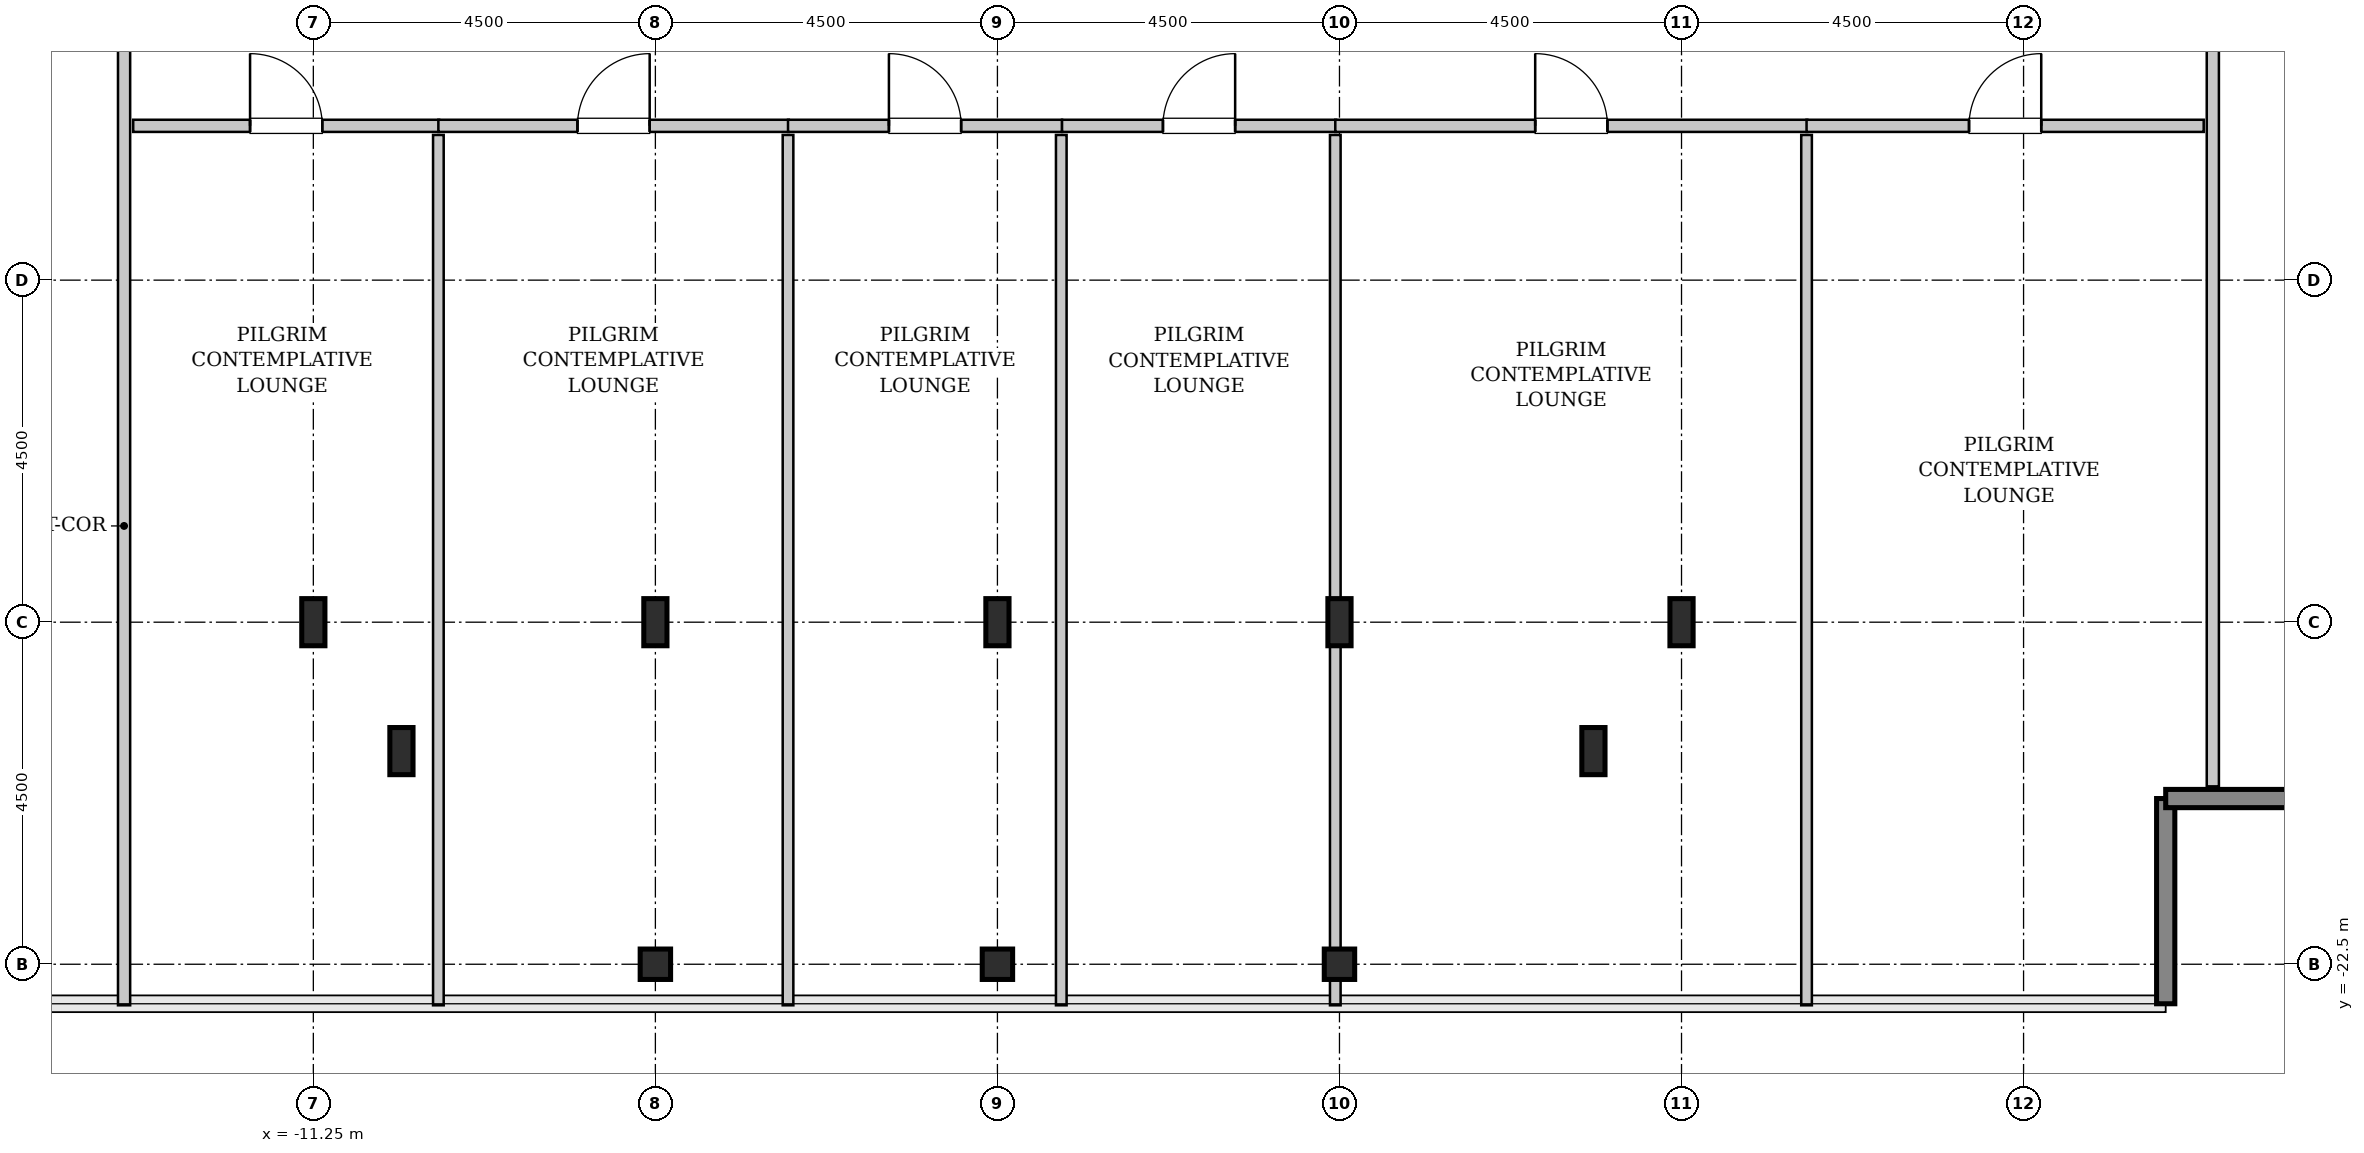
"""IFC4 building model, lengths in metres.
Left out: names, types, materials, properties, quantities, classifications, styles, units other than length and angle.
Written with IfcOpenShell. Run it as: python <this file> out.ifc"""

import sys

from ifc_helpers import new_model, si_unit, direction, frame, frame_2d, origin, origin_2d, place, context, subcontext, project, spatial, rectangle, hollow_rectangle, i_section, extrude, source, transform, mapped, element, fill, save


model = new_model("IFC4")
c1 = context("Model", 3, precision=1e-05, world=origin(), true_north=direction((0.0, 1.0)))
c2 = subcontext(c1, "Body", "Model", "MODEL_VIEW")
j1 = project(units=[si_unit("LENGTHUNIT", "METRE"), si_unit("PLANEANGLEUNIT", "RADIAN")], contexts=[c1])
p1 = place(None, origin())
s1 = spatial("IfcSite", under=j1, at=p1, CompositionType="ELEMENT")
p2 = place(p1, origin())
s2 = spatial("IfcBuilding", under=s1, at=p2, CompositionType="ELEMENT")
p3 = place(p2, frame((0.0, 0.0, 345.2)))
s3 = spatial("IfcBuildingStorey", under=s2, at=p3, CompositionType="ELEMENT", Elevation=345.2)
m1 = source(origin(), c2, "Body", "SweptSolid", [
    extrude(i_section(OverallWidth=0.305, OverallDepth=0.62, WebThickness=0.021, FlangeThickness=0.04, FilletRadius=0.027, at=origin_2d()), origin(), (0.0, 0.0, 1.0), 3.8),
])
for number, where, z_axis, x_axis in (
    (1, (-11.25, -18.0, 0.0), (0.0, 0.0, 1.0), (1.0, 0.0, 0.0)),
    (2, (-10.091, -19.696, 0.0), (0.0, 0.0, 1.0), (1.0, 0.0, 0.0)),
):
    element("IfcColumn", number, at=place(p3, frame(where, z_axis=z_axis, x_axis=x_axis)), inside=s3, PredefinedType="COLUMN", context=c2, shape_type="MappedRepresentation", body=[
        mapped(m1, transform((0.0, 0.0, 0.0), x_axis=(1.0, 0.0, 0.0), y_axis=(0.0, 1.0, 0.0), z_axis=(0.0, 0.0, 1.0), scale=1.0)),
    ])
m2 = source(origin(), c2, "Body", "SweptSolid", [
    extrude(hollow_rectangle(XDim=0.4, YDim=0.4, WallThickness=0.02, InnerFilletRadius=0.02, OuterFilletRadius=0.04, at=origin_2d()), origin(), (0.0, 0.0, 1.0), 3.8),
])
p4 = place(p3, frame((-6.75, -22.5, 0.0), z_axis=(0.0, 0.0, 1.0), x_axis=(1.0, 0.0, 0.0)))
e3 = element("IfcColumn", 3, at=p4, inside=s3, PredefinedType="COLUMN", context=c2, shape_type="MappedRepresentation", body=[
    mapped(m2, transform((0.0, 0.0, 0.0), x_axis=(1.0, 0.0, 0.0), y_axis=(0.0, 1.0, 0.0), z_axis=(0.0, 0.0, 1.0), scale=1.0)),
])
p5 = place(p3, frame((-6.75, -18.0, 0.0), z_axis=(0.0, 0.0, 1.0), x_axis=(1.0, 0.0, 0.0)))
e4 = element("IfcColumn", 4, at=p5, inside=s3, PredefinedType="COLUMN", context=c2, shape_type="MappedRepresentation", body=[
    mapped(m1, transform((0.0, 0.0, 0.0), x_axis=(1.0, 0.0, 0.0), y_axis=(0.0, 1.0, 0.0), z_axis=(0.0, 0.0, 1.0), scale=1.0)),
])
p6 = place(p3, frame((-2.25, -22.5, 0.0), z_axis=(0.0, 0.0, 1.0), x_axis=(1.0, 0.0, 0.0)))
e5 = element("IfcColumn", 5, at=p6, inside=s3, PredefinedType="COLUMN", context=c2, shape_type="MappedRepresentation", body=[
    mapped(m2, transform((0.0, 0.0, 0.0), x_axis=(1.0, 0.0, 0.0), y_axis=(0.0, 1.0, 0.0), z_axis=(0.0, 0.0, 1.0), scale=1.0)),
])
p7 = place(p3, frame((-2.25, -18.0, 0.0), z_axis=(0.0, 0.0, 1.0), x_axis=(1.0, 0.0, 0.0)))
e6 = element("IfcColumn", 6, at=p7, inside=s3, PredefinedType="COLUMN", context=c2, shape_type="MappedRepresentation", body=[
    mapped(m1, transform((0.0, 0.0, 0.0), x_axis=(1.0, 0.0, 0.0), y_axis=(0.0, 1.0, 0.0), z_axis=(0.0, 0.0, 1.0), scale=1.0)),
])
p8 = place(p3, frame((2.25, -22.5, 0.0), z_axis=(0.0, 0.0, 1.0), x_axis=(1.0, 0.0, 0.0)))
e7 = element("IfcColumn", 7, at=p8, inside=s3, PredefinedType="COLUMN", context=c2, shape_type="MappedRepresentation", body=[
    mapped(m2, transform((0.0, 0.0, 0.0), x_axis=(1.0, 0.0, 0.0), y_axis=(0.0, 1.0, 0.0), z_axis=(0.0, 0.0, 1.0), scale=1.0)),
])
for number, where, z_axis, x_axis in (
    (8, (2.25, -18.0, 0.0), (0.0, 0.0, 1.0), (1.0, 0.0, 0.0)),
    (9, (5.591, -19.696, 0.0), (0.0, 0.0, 1.0), (1.0, 0.0, 0.0)),
    (10, (6.75, -18.0, 0.0), (0.0, 0.0, 1.0), (1.0, 0.0, 0.0)),
):
    element("IfcColumn", number, at=place(p3, frame(where, z_axis=z_axis, x_axis=x_axis)), inside=s3, PredefinedType="COLUMN", context=c2, shape_type="MappedRepresentation", body=[
        mapped(m1, transform((0.0, 0.0, 0.0), x_axis=(1.0, 0.0, 0.0), y_axis=(0.0, 1.0, 0.0), z_axis=(0.0, 0.0, 1.0), scale=1.0)),
    ])
m3 = source(origin(), c2, "Body", "SweptSolid", [
    extrude(rectangle(XDim=2.7, YDim=0.24, at=frame_2d((1.35, 0.0))), origin(), (0.0, 0.0, 1.0), 3.5),
])
for number, where, z_axis, x_axis in (
    (11, (13.12, -23.02, 0.0), (0.0, 0.0, 1.0), (0.0, 1.0, 0.0)),
    (12, (13.12, -20.32, 0.0), (0.0, 0.0, 1.0), (1.0, 0.0, 0.0)),
):
    element("IfcWall", number, at=place(p3, frame(where, z_axis=z_axis, x_axis=x_axis)), inside=s3, PredefinedType="SHEAR", context=c2, shape_type="MappedRepresentation", body=[
        mapped(m3, transform((0.0, 0.0, 0.0), x_axis=(1.0, 0.0, 0.0), y_axis=(0.0, 1.0, 0.0), z_axis=(0.0, 0.0, 1.0), scale=1.0)),
    ])
m4 = source(origin(), c2, "Body", "SweptSolid", [
    extrude(rectangle(XDim=14.545, YDim=0.16, at=frame_2d((7.272, 0.0))), origin(), (0.0, 0.0, 1.0), 3.485),
])
p9 = place(p3, frame((-13.74, -23.04, 0.0), z_axis=(0.0, 0.0, 1.0), x_axis=(0.0, 1.0, 0.0)))
e13 = element("IfcWall", 13, at=p9, inside=s3, PredefinedType="PARTITIONING", context=c2, shape_type="MappedRepresentation", body=[
    mapped(m4, transform((0.0, 0.0, 0.0), x_axis=(1.0, 0.0, 0.0), y_axis=(0.0, 1.0, 0.0), z_axis=(0.0, 0.0, 1.0), scale=1.0)),
])
p10 = place(p9, frame((12.562, 0.0, 0.0)))
e14 = element("IfcOpeningElement", 14, at=p10, cuts=e13, PredefinedType="OPENING", context=c2, shape_type="SweptSolid", body=[
    extrude(rectangle(XDim=0.95, YDim=2.1, at=frame_2d((0.475, 1.05))), frame((0.0, 0.09, 0.0), z_axis=(0.0, -1.0, 0.0), x_axis=(1.0, 0.0, 0.0)), (0.0, 0.0, 1.0), 0.18),
])
m5 = source(origin(), c2, "Body", "SweptSolid", [
    extrude(rectangle(XDim=12.365, YDim=0.16, at=frame_2d((6.183, 0.0))), origin(), (0.0, 0.0, 1.0), 3.485),
])
p11 = place(p3, frame((13.74, -20.16, 0.0), z_axis=(0.0, 0.0, 1.0), x_axis=(0.0, 1.0, 0.0)))
e15 = element("IfcWall", 15, at=p11, inside=s3, PredefinedType="PARTITIONING", context=c2, shape_type="MappedRepresentation", body=[
    mapped(m5, transform((0.0, 0.0, 0.0), x_axis=(1.0, 0.0, 0.0), y_axis=(0.0, 1.0, 0.0), z_axis=(0.0, 0.0, 1.0), scale=1.0)),
])
p12 = place(p11, frame((10.032, 0.0, 0.0)))
e16 = element("IfcOpeningElement", 16, at=p12, cuts=e15, PredefinedType="OPENING", context=c2, shape_type="SweptSolid", body=[
    extrude(rectangle(XDim=0.95, YDim=2.1, at=frame_2d((0.475, 1.05))), frame((0.0, 0.09, 0.0), z_axis=(0.0, -1.0, 0.0), x_axis=(1.0, 0.0, 0.0)), (0.0, 0.0, 1.0), 0.18),
])
m6 = source(origin(), c2, "Body", "SweptSolid", [
    extrude(rectangle(XDim=4.025, YDim=0.16, at=frame_2d((2.013, 0.0))), origin(), (0.0, 0.0, 1.0), 3.485),
])
p13 = place(p3, frame((-13.62, -11.47, 0.0), z_axis=(0.0, 0.0, 1.0), x_axis=(1.0, 0.0, 0.0)))
e17 = element("IfcWall", 17, at=p13, inside=s3, PredefinedType="PARTITIONING", context=c2, shape_type="MappedRepresentation", body=[
    mapped(m6, transform((0.0, 0.0, 0.0), x_axis=(1.0, 0.0, 0.0), y_axis=(0.0, 1.0, 0.0), z_axis=(0.0, 0.0, 1.0), scale=1.0)),
])
p14 = place(p13, frame((1.538, 0.0, 0.0)))
e18 = element("IfcOpeningElement", 18, at=p14, cuts=e17, PredefinedType="OPENING", context=c2, shape_type="SweptSolid", body=[
    extrude(rectangle(XDim=0.95, YDim=2.1, at=frame_2d((0.475, 1.05))), frame((0.0, 0.09, 0.0), z_axis=(0.0, -1.0, 0.0), x_axis=(1.0, 0.0, 0.0)), (0.0, 0.0, 1.0), 0.18),
])
m7 = source(origin(), c2, "Body", "SweptSolid", [
    extrude(rectangle(XDim=11.45, YDim=0.14, at=frame_2d((5.725, 0.0))), origin(), (0.0, 0.0, 1.0), 3.485),
])
p15 = place(p3, frame((-9.605, -23.04, 0.0), z_axis=(0.0, 0.0, 1.0), x_axis=(0.0, 1.0, 0.0)))
e19 = element("IfcWall", 19, at=p15, inside=s3, PredefinedType="PARTITIONING", context=c2, shape_type="MappedRepresentation", body=[
    mapped(m7, transform((0.0, 0.0, 0.0), x_axis=(1.0, 0.0, 0.0), y_axis=(0.0, 1.0, 0.0), z_axis=(0.0, 0.0, 1.0), scale=1.0)),
])
m8 = source(origin(), c2, "Body", "SweptSolid", [
    extrude(rectangle(XDim=4.61, YDim=0.16, at=frame_2d((2.305, 0.0))), origin(), (0.0, 0.0, 1.0), 3.485),
])
p16 = place(p3, frame((-9.605, -11.47, 0.0), z_axis=(0.0, 0.0, 1.0), x_axis=(1.0, 0.0, 0.0)))
e20 = element("IfcWall", 20, at=p16, inside=s3, PredefinedType="PARTITIONING", context=c2, shape_type="MappedRepresentation", body=[
    mapped(m8, transform((0.0, 0.0, 0.0), x_axis=(1.0, 0.0, 0.0), y_axis=(0.0, 1.0, 0.0), z_axis=(0.0, 0.0, 1.0), scale=1.0)),
])
p17 = place(p16, frame((1.83, 0.0, 0.0)))
e21 = element("IfcOpeningElement", 21, at=p17, cuts=e20, PredefinedType="OPENING", context=c2, shape_type="SweptSolid", body=[
    extrude(rectangle(XDim=0.95, YDim=2.1, at=frame_2d((0.475, 1.05))), frame((0.0, 0.09, 0.0), z_axis=(0.0, -1.0, 0.0), x_axis=(1.0, 0.0, 0.0)), (0.0, 0.0, 1.0), 0.18),
])
p18 = place(p3, frame((-5.005, -23.04, 0.0), z_axis=(0.0, 0.0, 1.0), x_axis=(0.0, 1.0, 0.0)))
e22 = element("IfcWall", 22, at=p18, inside=s3, PredefinedType="PARTITIONING", context=c2, shape_type="MappedRepresentation", body=[
    mapped(m7, transform((0.0, 0.0, 0.0), x_axis=(1.0, 0.0, 0.0), y_axis=(0.0, 1.0, 0.0), z_axis=(0.0, 0.0, 1.0), scale=1.0)),
])
m9 = source(origin(), c2, "Body", "SweptSolid", [
    extrude(rectangle(XDim=3.605, YDim=0.16, at=frame_2d((1.802, 0.0))), origin(), (0.0, 0.0, 1.0), 3.485),
])
p19 = place(p3, frame((-5.005, -11.47, 0.0), z_axis=(0.0, 0.0, 1.0), x_axis=(1.0, 0.0, 0.0)))
e23 = element("IfcWall", 23, at=p19, inside=s3, PredefinedType="PARTITIONING", context=c2, shape_type="MappedRepresentation", body=[
    mapped(m9, transform((0.0, 0.0, 0.0), x_axis=(1.0, 0.0, 0.0), y_axis=(0.0, 1.0, 0.0), z_axis=(0.0, 0.0, 1.0), scale=1.0)),
])
p20 = place(p19, frame((1.327, 0.0, 0.0)))
e24 = element("IfcOpeningElement", 24, at=p20, cuts=e23, PredefinedType="OPENING", context=c2, shape_type="SweptSolid", body=[
    extrude(rectangle(XDim=0.95, YDim=2.1, at=frame_2d((0.475, 1.05))), frame((0.0, 0.09, 0.0), z_axis=(0.0, -1.0, 0.0), x_axis=(1.0, 0.0, 0.0)), (0.0, 0.0, 1.0), 0.18),
])
p21 = place(p3, frame((-1.41, -23.04, 0.0), z_axis=(0.0, 0.0, 1.0), x_axis=(0.0, 1.0, 0.0)))
e25 = element("IfcWall", 25, at=p21, inside=s3, PredefinedType="PARTITIONING", context=c2, shape_type="MappedRepresentation", body=[
    mapped(m7, transform((0.0, 0.0, 0.0), x_axis=(1.0, 0.0, 0.0), y_axis=(0.0, 1.0, 0.0), z_axis=(0.0, 0.0, 1.0), scale=1.0)),
])
p22 = place(p3, frame((-1.4, -11.47, 0.0), z_axis=(0.0, 0.0, 1.0), x_axis=(1.0, 0.0, 0.0)))
e26 = element("IfcWall", 26, at=p22, inside=s3, PredefinedType="PARTITIONING", context=c2, shape_type="MappedRepresentation", body=[
    mapped(m9, transform((0.0, 0.0, 0.0), x_axis=(1.0, 0.0, 0.0), y_axis=(0.0, 1.0, 0.0), z_axis=(0.0, 0.0, 1.0), scale=1.0)),
])
p23 = place(p22, frame((1.327, 0.0, 0.0)))
e27 = element("IfcOpeningElement", 27, at=p23, cuts=e26, PredefinedType="OPENING", context=c2, shape_type="SweptSolid", body=[
    extrude(rectangle(XDim=0.95, YDim=2.1, at=frame_2d((0.475, 1.05))), frame((0.0, 0.09, 0.0), z_axis=(0.0, -1.0, 0.0), x_axis=(1.0, 0.0, 0.0)), (0.0, 0.0, 1.0), 0.18),
])
m10 = source(origin(), c2, "Body", "SweptSolid", [
    extrude(rectangle(XDim=11.45, YDim=0.14, at=frame_2d((5.725, 0.0))), origin(), (0.0, 0.0, 1.0), 2.925),
])
p24 = place(p3, frame((2.195, -23.04, 0.0), z_axis=(0.0, 0.0, 1.0), x_axis=(0.0, 1.0, 0.0)))
e28 = element("IfcWall", 28, at=p24, inside=s3, PredefinedType="PARTITIONING", context=c2, shape_type="MappedRepresentation", body=[
    mapped(m10, transform((0.0, 0.0, 0.0), x_axis=(1.0, 0.0, 0.0), y_axis=(0.0, 1.0, 0.0), z_axis=(0.0, 0.0, 1.0), scale=1.0)),
])
m11 = source(origin(), c2, "Body", "SweptSolid", [
    extrude(rectangle(XDim=6.21, YDim=0.16, at=frame_2d((3.105, 0.0))), origin(), (0.0, 0.0, 1.0), 3.485),
])
p25 = place(p3, frame((2.195, -11.47, 0.0), z_axis=(0.0, 0.0, 1.0), x_axis=(1.0, 0.0, 0.0)))
e29 = element("IfcWall", 29, at=p25, inside=s3, PredefinedType="PARTITIONING", context=c2, shape_type="MappedRepresentation", body=[
    mapped(m11, transform((0.0, 0.0, 0.0), x_axis=(1.0, 0.0, 0.0), y_axis=(0.0, 1.0, 0.0), z_axis=(0.0, 0.0, 1.0), scale=1.0)),
])
p26 = place(p25, frame((2.63, 0.0, 0.0)))
e30 = element("IfcOpeningElement", 30, at=p26, cuts=e29, PredefinedType="OPENING", context=c2, shape_type="SweptSolid", body=[
    extrude(rectangle(XDim=0.95, YDim=2.1, at=frame_2d((0.475, 1.05))), frame((0.0, 0.09, 0.0), z_axis=(0.0, -1.0, 0.0), x_axis=(1.0, 0.0, 0.0)), (0.0, 0.0, 1.0), 0.18),
])
p27 = place(p3, frame((8.395, -23.04, 0.0), z_axis=(0.0, 0.0, 1.0), x_axis=(0.0, 1.0, 0.0)))
e31 = element("IfcWall", 31, at=p27, inside=s3, PredefinedType="PARTITIONING", context=c2, shape_type="MappedRepresentation", body=[
    mapped(m7, transform((0.0, 0.0, 0.0), x_axis=(1.0, 0.0, 0.0), y_axis=(0.0, 1.0, 0.0), z_axis=(0.0, 0.0, 1.0), scale=1.0)),
])
m12 = source(origin(), c2, "Body", "SweptSolid", [
    extrude(rectangle(XDim=5.225, YDim=0.16, at=frame_2d((2.613, 0.0))), origin(), (0.0, 0.0, 1.0), 3.485),
])
p28 = place(p3, frame((8.395, -11.47, 0.0), z_axis=(0.0, 0.0, 1.0), x_axis=(1.0, 0.0, 0.0)))
e32 = element("IfcWall", 32, at=p28, inside=s3, PredefinedType="PARTITIONING", context=c2, shape_type="MappedRepresentation", body=[
    mapped(m12, transform((0.0, 0.0, 0.0), x_axis=(1.0, 0.0, 0.0), y_axis=(0.0, 1.0, 0.0), z_axis=(0.0, 0.0, 1.0), scale=1.0)),
])
p29 = place(p28, frame((2.137, 0.0, 0.0)))
e33 = element("IfcOpeningElement", 33, at=p29, cuts=e32, PredefinedType="OPENING", context=c2, shape_type="SweptSolid", body=[
    extrude(rectangle(XDim=0.95, YDim=2.1, at=frame_2d((0.475, 1.05))), frame((0.0, 0.09, 0.0), z_axis=(0.0, -1.0, 0.0), x_axis=(1.0, 0.0, 0.0)), (0.0, 0.0, 1.0), 0.18),
])
m13 = source(origin(), c2, "Body", "SweptSolid", [
    extrude(rectangle(XDim=0.95, YDim=2.1, at=frame_2d((0.475, 1.05))), frame((0.0, 0.025, 0.0), z_axis=(0.0, -1.0, 0.0), x_axis=(1.0, 0.0, 0.0)), (0.0, 0.0, 1.0), 0.05),
])
p30 = place(p14, origin())
e34 = element("IfcDoor", 34, at=p30, inside=s3, OperationType="SINGLE_SWING_LEFT", PredefinedType="DOOR", context=c2, shape_type="MappedRepresentation", body=[
    mapped(m13, transform((0.0, 0.0, 0.0), x_axis=(1.0, 0.0, 0.0), y_axis=(0.0, 1.0, 0.0), z_axis=(0.0, 0.0, 1.0), scale=1.0)),
])
fill(e18, e34)
p31 = place(p17, origin())
e35 = element("IfcDoor", 35, at=p31, inside=s3, OperationType="SINGLE_SWING_RIGHT", PredefinedType="DOOR", context=c2, shape_type="MappedRepresentation", body=[
    mapped(m13, transform((0.0, 0.0, 0.0), x_axis=(1.0, 0.0, 0.0), y_axis=(0.0, 1.0, 0.0), z_axis=(0.0, 0.0, 1.0), scale=1.0)),
])
fill(e21, e35)
p32 = place(p20, origin())
e36 = element("IfcDoor", 36, at=p32, inside=s3, OperationType="SINGLE_SWING_LEFT", PredefinedType="DOOR", context=c2, shape_type="MappedRepresentation", body=[
    mapped(m13, transform((0.0, 0.0, 0.0), x_axis=(1.0, 0.0, 0.0), y_axis=(0.0, 1.0, 0.0), z_axis=(0.0, 0.0, 1.0), scale=1.0)),
])
fill(e24, e36)
p33 = place(p23, origin())
e37 = element("IfcDoor", 37, at=p33, inside=s3, OperationType="SINGLE_SWING_RIGHT", PredefinedType="DOOR", context=c2, shape_type="MappedRepresentation", body=[
    mapped(m13, transform((0.0, 0.0, 0.0), x_axis=(1.0, 0.0, 0.0), y_axis=(0.0, 1.0, 0.0), z_axis=(0.0, 0.0, 1.0), scale=1.0)),
])
fill(e27, e37)
p34 = place(p26, origin())
e38 = element("IfcDoor", 38, at=p34, inside=s3, OperationType="SINGLE_SWING_LEFT", PredefinedType="DOOR", context=c2, shape_type="MappedRepresentation", body=[
    mapped(m13, transform((0.0, 0.0, 0.0), x_axis=(1.0, 0.0, 0.0), y_axis=(0.0, 1.0, 0.0), z_axis=(0.0, 0.0, 1.0), scale=1.0)),
])
fill(e30, e38)
p35 = place(p29, origin())
e39 = element("IfcDoor", 39, at=p35, inside=s3, OperationType="SINGLE_SWING_RIGHT", PredefinedType="DOOR", context=c2, shape_type="MappedRepresentation", body=[
    mapped(m13, transform((0.0, 0.0, 0.0), x_axis=(1.0, 0.0, 0.0), y_axis=(0.0, 1.0, 0.0), z_axis=(0.0, 0.0, 1.0), scale=1.0)),
])
fill(e33, e39)
save(model, sys.argv[1])
